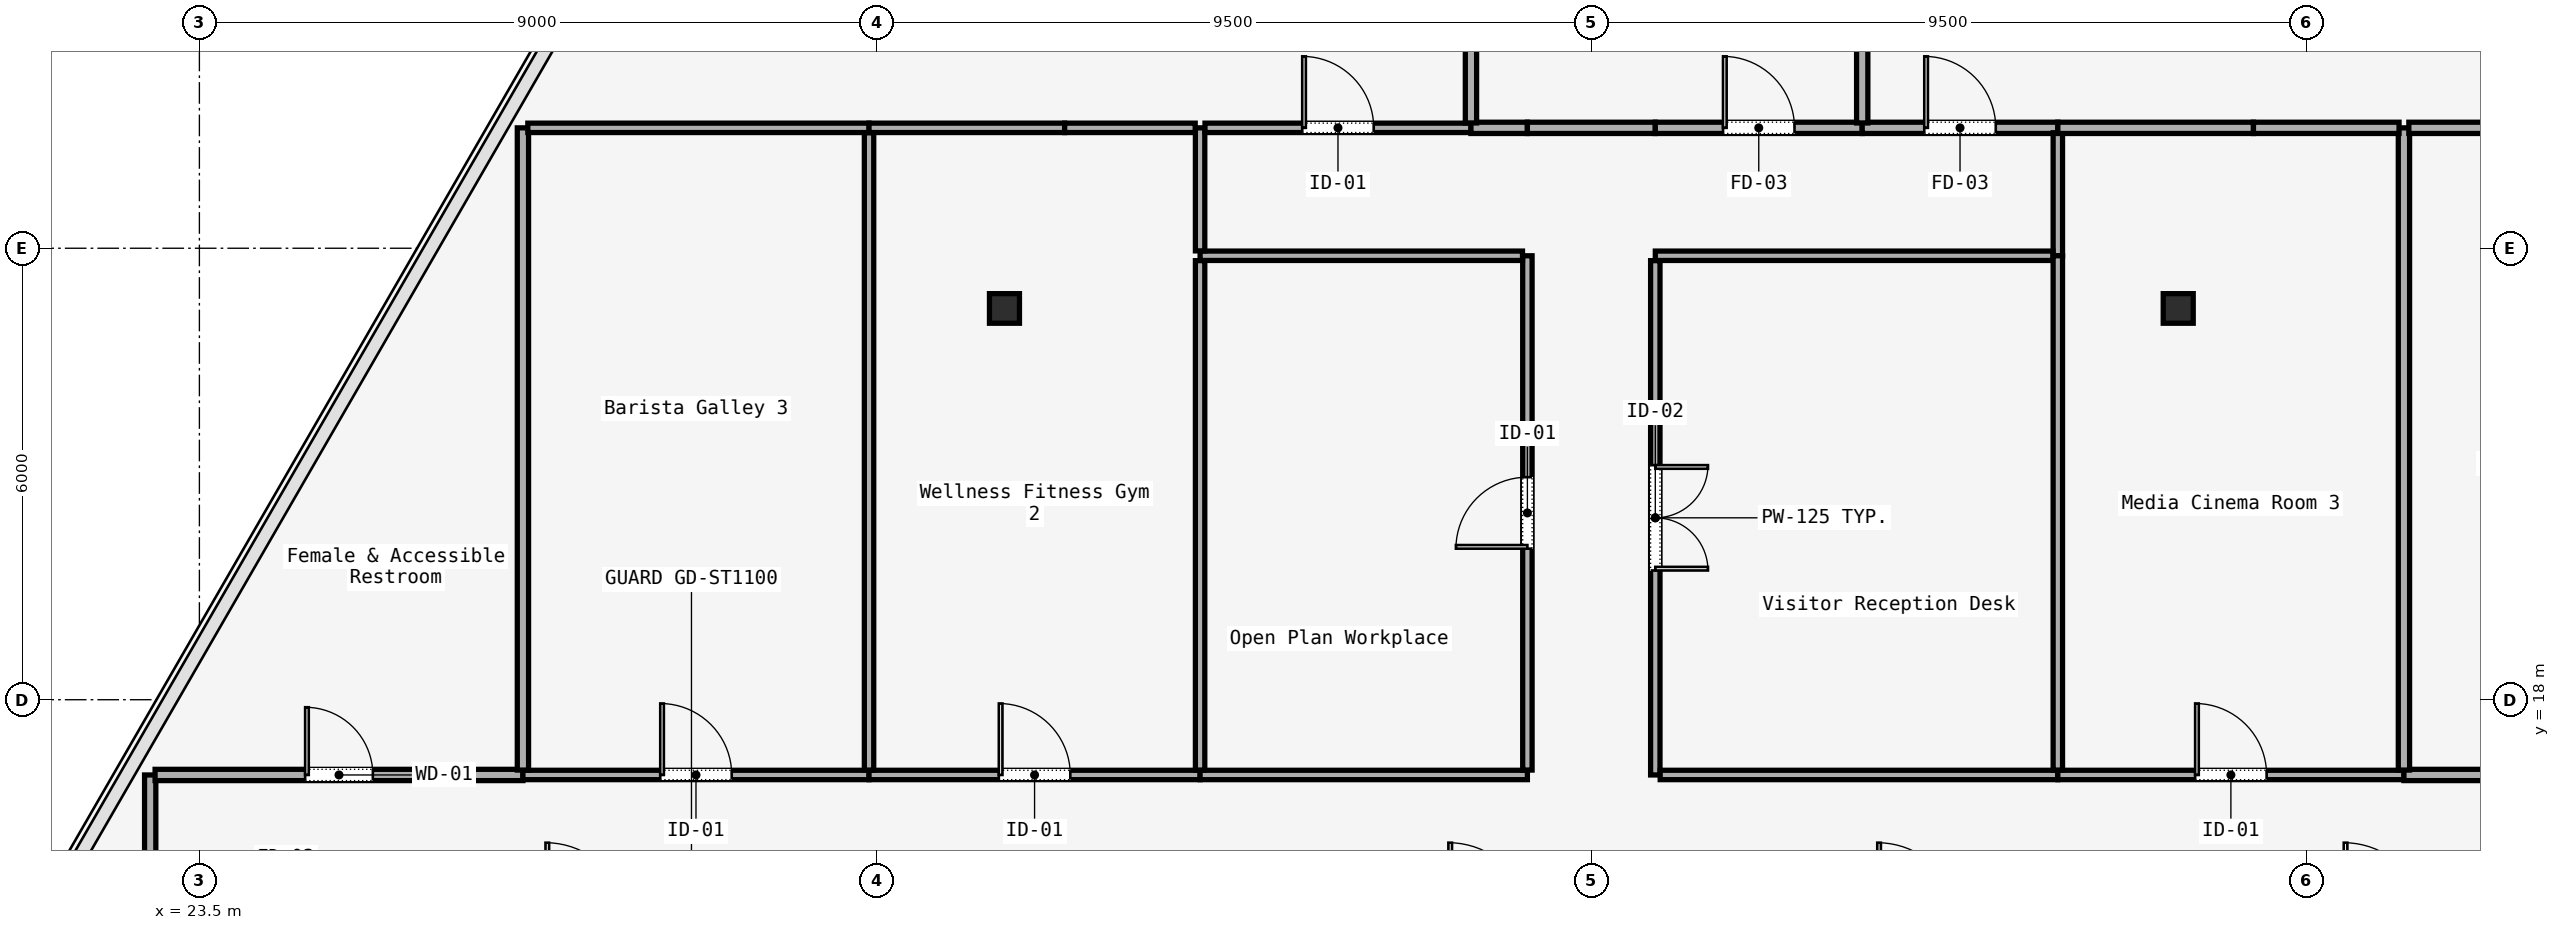
"""IFC4 building model, lengths in metres.
Left out: names, types, materials, properties, quantities, classifications, styles, units other than length and angle.
Written with IfcOpenShell. Run it as: python <this file> out.ifc"""

import sys

from ifc_helpers import new_model, si_unit, direction, frame, frame_2d, origin, origin_2d, place, context, subcontext, project, spatial, rectangle, i_section, extrude, element, fill, save


model = new_model("IFC4")
c1 = context("Model", 3, precision=1e-05, world=origin(), true_north=direction((0.0, 1.0)))
c2 = subcontext(c1, "Body", "Model", "MODEL_VIEW")
j1 = project(units=[si_unit("LENGTHUNIT", "METRE"), si_unit("PLANEANGLEUNIT", "RADIAN")], contexts=[c1])
p1 = place(None, origin())
s1 = spatial("IfcSite", under=j1, at=p1, CompositionType="ELEMENT")
p2 = place(p1, origin())
s2 = spatial("IfcBuilding", under=s1, at=p2, CompositionType="ELEMENT")
p3 = place(p2, frame((0.0, 0.0, 240.8)))
s3 = spatial("IfcBuildingStorey", under=s2, at=p3, CompositionType="ELEMENT", Elevation=240.8)
for number, where, z_axis, x_axis in (
    (1, (34.2, 23.2, 0.0), (0.0, 0.0, 1.0), (1.0, 0.0, 0.0)),
    (2, (49.8, 23.2, 0.0), (0.0, 0.0, 1.0), (1.0, 0.0, 0.0)),
):
    element("IfcColumn", number, at=place(p3, frame(where, z_axis=z_axis, x_axis=x_axis)), inside=s3, PredefinedType="COLUMN", context=c2, shape_type="SweptSolid", body=[
        extrude(i_section(OverallWidth=0.399, OverallDepth=0.394, WebThickness=0.023, FlangeThickness=0.037, FilletRadius=0.015, at=origin_2d()), origin(), (0.0, 0.0, 1.0), 3.58),
    ])
p4 = place(p3, frame((22.846, 15.215, 0.0), z_axis=(0.0, 0.0, 1.0), x_axis=(0.0, 1.0, 0.0)))
e3 = element("IfcWall", 3, at=p4, inside=s3, PredefinedType="PARTITIONING", context=c2, shape_type="SweptSolid", body=[
    extrude(rectangle(XDim=1.785, YDim=0.15, at=frame_2d((0.893, 0.0))), origin(), (0.0, 0.0, 1.0), 3.01),
])
p5 = place(p3, frame((22.911, 17.0, 0.0), z_axis=(0.0, 0.0, 1.0), x_axis=(1.0, 0.0, 0.0)))
e4 = element("IfcWall", 4, at=p5, inside=s3, PredefinedType="PARTITIONING", context=c2, shape_type="SweptSolid", body=[
    extrude(rectangle(XDim=4.889, YDim=0.15, at=frame_2d((2.445, 0.0))), origin(), (0.0, 0.0, 1.0), 3.01),
])
p6 = place(p5, frame((1.994, 0.0, 0.0)))
e5 = element("IfcOpeningElement", 5, at=p6, cuts=e4, PredefinedType="OPENING", context=c2, shape_type="SweptSolid", body=[
    extrude(rectangle(XDim=0.9, YDim=2.15, at=frame_2d((0.45, 1.075))), frame((0.0, 0.075, 0.0), z_axis=(0.0, -1.0, 0.0), x_axis=(1.0, 0.0, 0.0)), (0.0, 0.0, 1.0), 0.15),
])
p7 = place(p3, frame((27.8, 17.0, 0.0), z_axis=(0.0, 0.0, 1.0), x_axis=(1.0, 0.0, 0.0)))
e6 = element("IfcWall", 6, at=p7, inside=s3, PredefinedType="PARTITIONING", context=c2, shape_type="SweptSolid", body=[
    extrude(rectangle(XDim=4.6, YDim=0.125, at=frame_2d((2.3, 0.0))), origin(), (0.0, 0.0, 1.0), 3.01),
])
p8 = place(p7, frame((1.825, 0.0, 0.0)))
e7 = element("IfcOpeningElement", 7, at=p8, cuts=e6, PredefinedType="OPENING", context=c2, shape_type="SweptSolid", body=[
    extrude(rectangle(XDim=0.95, YDim=2.2, at=frame_2d((0.475, 1.1))), frame((0.0, 0.062, 0.0), z_axis=(0.0, -1.0, 0.0), x_axis=(1.0, 0.0, 0.0)), (0.0, 0.0, 1.0), 0.125),
])
p9 = place(p3, frame((32.4, 17.0, 0.0), z_axis=(0.0, 0.0, 1.0), x_axis=(1.0, 0.0, 0.0)))
e8 = element("IfcWall", 8, at=p9, inside=s3, PredefinedType="PARTITIONING", context=c2, shape_type="SweptSolid", body=[
    extrude(rectangle(XDim=4.4, YDim=0.125, at=frame_2d((2.2, 0.0))), origin(), (0.0, 0.0, 1.0), 3.01),
])
p10 = place(p9, frame((1.725, 0.0, 0.0)))
e9 = element("IfcOpeningElement", 9, at=p10, cuts=e8, PredefinedType="OPENING", context=c2, shape_type="SweptSolid", body=[
    extrude(rectangle(XDim=0.95, YDim=2.2, at=frame_2d((0.475, 1.1))), frame((0.0, 0.062, 0.0), z_axis=(0.0, -1.0, 0.0), x_axis=(1.0, 0.0, 0.0)), (0.0, 0.0, 1.0), 0.125),
])
p11 = place(p3, frame((36.8, 17.0, 0.0), z_axis=(0.0, 0.0, 1.0), x_axis=(1.0, 0.0, 0.0)))
e10 = element("IfcWall", 10, at=p11, inside=s3, PredefinedType="PARTITIONING", context=c2, shape_type="SweptSolid", body=[
    extrude(rectangle(XDim=4.35, YDim=0.125, at=frame_2d((2.175, 0.0))), origin(), (0.0, 0.0, 1.0), 3.01),
])
p12 = place(p3, frame((41.15, 17.065, 0.0), z_axis=(0.0, 0.0, 1.0), x_axis=(0.0, 1.0, 0.0)))
e11 = element("IfcWall", 11, at=p12, inside=s3, PredefinedType="PARTITIONING", context=c2, shape_type="SweptSolid", body=[
    extrude(rectangle(XDim=6.835, YDim=0.125, at=frame_2d((3.417, 0.0))), origin(), (0.0, 0.0, 1.0), 3.01),
])
p13 = place(p12, frame((2.942, 0.0, 0.0)))
e12 = element("IfcOpeningElement", 12, at=p13, cuts=e11, PredefinedType="OPENING", context=c2, shape_type="SweptSolid", body=[
    extrude(rectangle(XDim=0.95, YDim=2.2, at=frame_2d((0.475, 1.1))), frame((0.0, 0.062, 0.0), z_axis=(0.0, -1.0, 0.0), x_axis=(1.0, 0.0, 0.0)), (0.0, 0.0, 1.0), 0.125),
])
p14 = place(p3, frame((41.085, 23.9, 0.0), z_axis=(0.0, 0.0, 1.0), x_axis=(-1.0, 0.0, 0.0)))
e13 = element("IfcWall", 13, at=p14, inside=s3, PredefinedType="PARTITIONING", context=c2, shape_type="SweptSolid", body=[
    extrude(rectangle(XDim=4.285, YDim=0.125, at=frame_2d((2.143, 0.0))), origin(), (0.0, 0.0, 1.0), 3.01),
])
p15 = place(p3, frame((36.8, 23.965, 0.0), z_axis=(0.0, 0.0, 1.0), x_axis=(0.0, 1.0, 0.0)))
e14 = element("IfcWall", 14, at=p15, inside=s3, PredefinedType="PARTITIONING", context=c2, shape_type="SweptSolid", body=[
    extrude(rectangle(XDim=1.635, YDim=0.125, at=frame_2d((0.817, 0.0))), origin(), (0.0, 0.0, 1.0), 3.01),
])
p16 = place(p3, frame((36.865, 25.6, 0.0), z_axis=(0.0, 0.0, 1.0), x_axis=(1.0, 0.0, 0.0)))
e15 = element("IfcWall", 15, at=p16, inside=s3, PredefinedType="PARTITIONING", context=c2, shape_type="SweptSolid", body=[
    extrude(rectangle(XDim=3.535, YDim=0.125, at=frame_2d((1.768, 0.0))), origin(), (0.0, 0.0, 1.0), 3.01),
])
p17 = place(p16, frame((1.292, 0.0, 0.0)))
e16 = element("IfcOpeningElement", 16, at=p17, cuts=e15, PredefinedType="OPENING", context=c2, shape_type="SweptSolid", body=[
    extrude(rectangle(XDim=0.95, YDim=2.2, at=frame_2d((0.475, 1.1))), frame((0.0, 0.062, 0.0), z_axis=(0.0, -1.0, 0.0), x_axis=(1.0, 0.0, 0.0)), (0.0, 0.0, 1.0), 0.125),
])
p18 = place(p3, frame((40.4, 25.6, 0.0), z_axis=(0.0, 0.0, 1.0), x_axis=(1.0, 0.0, 0.0)))
e17 = element("IfcWall", 17, at=p18, inside=s3, PredefinedType="PARTITIONING", context=c2, shape_type="SweptSolid", body=[
    extrude(rectangle(XDim=0.75, YDim=0.15, at=frame_2d((0.375, 0.0))), origin(), (0.0, 0.0, 1.0), 3.01),
])
p19 = place(p3, frame((41.15, 25.6, 0.0), z_axis=(0.0, 0.0, 1.0), x_axis=(1.0, 0.0, 0.0)))
e18 = element("IfcWall", 18, at=p19, inside=s3, PredefinedType="PARTITIONING", context=c2, shape_type="SweptSolid", body=[
    extrude(rectangle(XDim=1.7, YDim=0.15, at=frame_2d((0.85, 0.0))), origin(), (0.0, 0.0, 1.0), 3.01),
])
p20 = place(p3, frame((42.85, 25.6, 0.0), z_axis=(0.0, 0.0, 1.0), x_axis=(1.0, 0.0, 0.0)))
e19 = element("IfcWall", 19, at=p20, inside=s3, PredefinedType="PARTITIONING", context=c2, shape_type="SweptSolid", body=[
    extrude(rectangle(XDim=2.75, YDim=0.15, at=frame_2d((1.375, 0.0))), origin(), (0.0, 0.0, 1.0), 3.01),
])
p21 = place(p20, frame((0.9, 0.0, 0.0)))
e20 = element("IfcOpeningElement", 20, at=p21, cuts=e19, PredefinedType="OPENING", context=c2, shape_type="SweptSolid", body=[
    extrude(rectangle(XDim=0.95, YDim=2.2, at=frame_2d((0.475, 1.1))), frame((0.0, 0.075, 0.0), z_axis=(0.0, -1.0, 0.0), x_axis=(1.0, 0.0, 0.0)), (0.0, 0.0, 1.0), 0.15),
])
p22 = place(p3, frame((45.6, 25.6, 0.0), z_axis=(0.0, 0.0, 1.0), x_axis=(1.0, 0.0, 0.0)))
e21 = element("IfcWall", 21, at=p22, inside=s3, PredefinedType="PARTITIONING", context=c2, shape_type="SweptSolid", body=[
    extrude(rectangle(XDim=2.6, YDim=0.15, at=frame_2d((1.3, 0.0))), origin(), (0.0, 0.0, 1.0), 3.01),
])
p23 = place(p22, frame((0.825, 0.0, 0.0)))
e22 = element("IfcOpeningElement", 22, at=p23, cuts=e21, PredefinedType="OPENING", context=c2, shape_type="SweptSolid", body=[
    extrude(rectangle(XDim=0.95, YDim=2.2, at=frame_2d((0.475, 1.1))), frame((0.0, 0.075, 0.0), z_axis=(0.0, -1.0, 0.0), x_axis=(1.0, 0.0, 0.0)), (0.0, 0.0, 1.0), 0.15),
])
p24 = place(p3, frame((48.2, 25.535, 0.0), z_axis=(0.0, 0.0, 1.0), x_axis=(0.0, -1.0, 0.0)))
e23 = element("IfcWall", 23, at=p24, inside=s3, PredefinedType="PARTITIONING", context=c2, shape_type="SweptSolid", body=[
    extrude(rectangle(XDim=1.635, YDim=0.125, at=frame_2d((0.817, 0.0))), origin(), (0.0, 0.0, 1.0), 3.01),
])
p25 = place(p3, frame((48.135, 23.9, 0.0), z_axis=(0.0, 0.0, 1.0), x_axis=(-1.0, 0.0, 0.0)))
e24 = element("IfcWall", 24, at=p25, inside=s3, PredefinedType="PARTITIONING", context=c2, shape_type="SweptSolid", body=[
    extrude(rectangle(XDim=5.285, YDim=0.125, at=frame_2d((2.643, 0.0))), origin(), (0.0, 0.0, 1.0), 3.01),
])
p26 = place(p3, frame((42.85, 23.835, 0.0), z_axis=(0.0, 0.0, 1.0), x_axis=(0.0, -1.0, 0.0)))
e25 = element("IfcWall", 25, at=p26, inside=s3, PredefinedType="PARTITIONING", context=c2, shape_type="SweptSolid", body=[
    extrude(rectangle(XDim=6.835, YDim=0.125, at=frame_2d((3.417, 0.0))), origin(), (0.0, 0.0, 1.0), 3.01),
])
p27 = place(p26, frame((2.718, 0.0, 0.0)))
e26 = element("IfcOpeningElement", 26, at=p27, cuts=e25, PredefinedType="OPENING", context=c2, shape_type="SweptSolid", body=[
    extrude(rectangle(XDim=1.4, YDim=2.2, at=frame_2d((0.7, 1.1))), frame((0.0, 0.062, 0.0), z_axis=(0.0, -1.0, 0.0), x_axis=(1.0, 0.0, 0.0)), (0.0, 0.0, 1.0), 0.125),
])
p28 = place(p3, frame((42.915, 17.0, 0.0), z_axis=(0.0, 0.0, 1.0), x_axis=(1.0, 0.0, 0.0)))
e27 = element("IfcWall", 27, at=p28, inside=s3, PredefinedType="PARTITIONING", context=c2, shape_type="SweptSolid", body=[
    extrude(rectangle(XDim=5.285, YDim=0.125, at=frame_2d((2.643, 0.0))), origin(), (0.0, 0.0, 1.0), 3.01),
])
p29 = place(p3, frame((48.2, 17.0, 0.0), z_axis=(0.0, 0.0, 1.0), x_axis=(1.0, 0.0, 0.0)))
e28 = element("IfcWall", 28, at=p29, inside=s3, PredefinedType="PARTITIONING", context=c2, shape_type="SweptSolid", body=[
    extrude(rectangle(XDim=4.6, YDim=0.125, at=frame_2d((2.3, 0.0))), origin(), (0.0, 0.0, 1.0), 3.01),
])
p30 = place(p29, frame((1.825, 0.0, 0.0)))
e29 = element("IfcOpeningElement", 29, at=p30, cuts=e28, PredefinedType="OPENING", context=c2, shape_type="SweptSolid", body=[
    extrude(rectangle(XDim=0.95, YDim=2.2, at=frame_2d((0.475, 1.1))), frame((0.0, 0.062, 0.0), z_axis=(0.0, -1.0, 0.0), x_axis=(1.0, 0.0, 0.0)), (0.0, 0.0, 1.0), 0.125),
])
p31 = place(p3, frame((52.8, 17.0, 0.0), z_axis=(0.0, 0.0, 1.0), x_axis=(1.0, 0.0, 0.0)))
e30 = element("IfcWall", 30, at=p31, inside=s3, PredefinedType="PARTITIONING", context=c2, shape_type="SweptSolid", body=[
    extrude(rectangle(XDim=4.6, YDim=0.15, at=frame_2d((2.3, 0.0))), origin(), (0.0, 0.0, 1.0), 3.01),
])
p32 = place(p31, frame((1.825, 0.0, 0.0)))
e31 = element("IfcOpeningElement", 31, at=p32, cuts=e30, PredefinedType="OPENING", context=c2, shape_type="SweptSolid", body=[
    extrude(rectangle(XDim=0.95, YDim=2.2, at=frame_2d((0.475, 1.1))), frame((0.0, 0.075, 0.0), z_axis=(0.0, -1.0, 0.0), x_axis=(1.0, 0.0, 0.0)), (0.0, 0.0, 1.0), 0.15),
])
p33 = place(p3, frame((27.8, 25.6, 0.0), z_axis=(0.0, 0.0, 1.0), x_axis=(0.0, -1.0, 0.0)))
e32 = element("IfcWall", 32, at=p33, inside=s3, PredefinedType="PARTITIONING", context=c2, shape_type="SweptSolid", body=[
    extrude(rectangle(XDim=8.535, YDim=0.15, at=frame_2d((4.268, 0.0))), origin(), (0.0, 0.0, 1.0), 3.01),
])
p34 = place(p3, frame((36.8, 17.065, 0.0), z_axis=(0.0, 0.0, 1.0), x_axis=(0.0, 1.0, 0.0)))
e33 = element("IfcWall", 33, at=p34, inside=s3, PredefinedType="PARTITIONING", context=c2, shape_type="SweptSolid", body=[
    extrude(rectangle(XDim=6.77, YDim=0.125, at=frame_2d((3.385, 0.0))), origin(), (0.0, 0.0, 1.0), 3.01),
])
p35 = place(p3, frame((48.2, 23.9, 0.0), z_axis=(0.0, 0.0, 1.0), x_axis=(0.0, -1.0, 0.0)))
e34 = element("IfcWall", 34, at=p35, inside=s3, PredefinedType="PARTITIONING", context=c2, shape_type="SweptSolid", body=[
    extrude(rectangle(XDim=6.835, YDim=0.125, at=frame_2d((3.417, 0.0))), origin(), (0.0, 0.0, 1.0), 3.01),
])
p36 = place(p3, frame((52.8, 17.065, 0.0), z_axis=(0.0, 0.0, 1.0), x_axis=(0.0, 1.0, 0.0)))
e35 = element("IfcWall", 35, at=p36, inside=s3, PredefinedType="PARTITIONING", context=c2, shape_type="SweptSolid", body=[
    extrude(rectangle(XDim=8.535, YDim=0.15, at=frame_2d((4.268, 0.0))), origin(), (0.0, 0.0, 1.0), 3.01),
])
p37 = place(p3, frame((52.865, 25.6, 0.0), z_axis=(0.0, 0.0, 1.0), x_axis=(1.0, 0.0, 0.0)))
e36 = element("IfcWall", 36, at=p37, inside=s3, PredefinedType="PARTITIONING", context=c2, shape_type="SweptSolid", body=[
    extrude(rectangle(XDim=3.633, YDim=0.15, at=frame_2d((1.817, 0.0))), origin(), (0.0, 0.0, 1.0), 3.01),
])
p38 = place(p3, frame((27.865, 25.6, 0.0), z_axis=(0.0, 0.0, 1.0), x_axis=(1.0, 0.0, 0.0)))
e37 = element("IfcWall", 37, at=p38, inside=s3, PredefinedType="PARTITIONING", context=c2, shape_type="SweptSolid", body=[
    extrude(rectangle(XDim=4.535, YDim=0.125, at=frame_2d((2.268, 0.0))), origin(), (0.0, 0.0, 1.0), 3.01),
])
p39 = place(p3, frame((32.4, 25.535, 0.0), z_axis=(0.0, 0.0, 1.0), x_axis=(0.0, -1.0, 0.0)))
e38 = element("IfcWall", 38, at=p39, inside=s3, PredefinedType="PARTITIONING", context=c2, shape_type="SweptSolid", body=[
    extrude(rectangle(XDim=8.47, YDim=0.125, at=frame_2d((4.235, 0.0))), origin(), (0.0, 0.0, 1.0), 3.01),
])
p40 = place(p3, frame((32.4, 25.6, 0.0), z_axis=(0.0, 0.0, 1.0), x_axis=(1.0, 0.0, 0.0)))
e39 = element("IfcWall", 39, at=p40, inside=s3, PredefinedType="PARTITIONING", context=c2, shape_type="SweptSolid", body=[
    extrude(rectangle(XDim=2.6, YDim=0.125, at=frame_2d((1.3, 0.0))), origin(), (0.0, 0.0, 1.0), 3.01),
])
p41 = place(p3, frame((35.0, 25.6, 0.0), z_axis=(0.0, 0.0, 1.0), x_axis=(1.0, 0.0, 0.0)))
e40 = element("IfcWall", 40, at=p41, inside=s3, PredefinedType="PARTITIONING", context=c2, shape_type="SweptSolid", body=[
    extrude(rectangle(XDim=1.735, YDim=0.125, at=frame_2d((0.868, 0.0))), origin(), (0.0, 0.0, 1.0), 3.01),
])
p42 = place(p3, frame((48.2, 25.6, 0.0), z_axis=(0.0, 0.0, 1.0), x_axis=(1.0, 0.0, 0.0)))
e41 = element("IfcWall", 41, at=p42, inside=s3, PredefinedType="PARTITIONING", context=c2, shape_type="SweptSolid", body=[
    extrude(rectangle(XDim=2.6, YDim=0.15, at=frame_2d((1.3, 0.0))), origin(), (0.0, 0.0, 1.0), 3.01),
])
p43 = place(p3, frame((50.8, 25.6, 0.0), z_axis=(0.0, 0.0, 1.0), x_axis=(1.0, 0.0, 0.0)))
e42 = element("IfcWall", 42, at=p43, inside=s3, PredefinedType="PARTITIONING", context=c2, shape_type="SweptSolid", body=[
    extrude(rectangle(XDim=1.935, YDim=0.15, at=frame_2d((0.968, 0.0))), origin(), (0.0, 0.0, 1.0), 3.01),
])
p44 = place(p3, frame((45.6, 25.665, 0.0), z_axis=(0.0, 0.0, 1.0), x_axis=(0.0, 1.0, 0.0)))
e43 = element("IfcWall", 43, at=p44, inside=s3, PredefinedType="PARTITIONING", context=c2, shape_type="SweptSolid", body=[
    extrude(rectangle(XDim=18.811, YDim=0.15, at=frame_2d((9.406, 0.0))), origin(), (0.0, 0.0, 1.0), 3.01),
])
p45 = place(p3, frame((40.4, 44.99, 0.0), z_axis=(0.0, 0.0, 1.0), x_axis=(0.0, -1.0, 0.0)))
e44 = element("IfcWall", 44, at=p45, inside=s3, PredefinedType="PARTITIONING", context=c2, shape_type="SweptSolid", body=[
    extrude(rectangle(XDim=19.324, YDim=0.15, at=frame_2d((9.662, 0.0))), origin(), (0.0, 0.0, 1.0), 3.01),
])
p46 = place(p6, origin())
e45 = element("IfcDoor", 45, at=p46, inside=s3, OperationType="SINGLE_SWING_RIGHT", PredefinedType="DOOR", context=c2, shape_type="SweptSolid", body=[
    extrude(rectangle(XDim=0.9, YDim=2.15, at=frame_2d((0.45, 1.075))), frame((0.0, 0.025, 0.0), z_axis=(0.0, -1.0, 0.0), x_axis=(1.0, 0.0, 0.0)), (0.0, 0.0, 1.0), 0.05),
])
fill(e5, e45)
p47 = place(p13, origin())
e46 = element("IfcDoor", 46, at=p47, inside=s3, OperationType="SINGLE_SWING_LEFT", PredefinedType="DOOR", context=c2, shape_type="SweptSolid", body=[
    extrude(rectangle(XDim=0.95, YDim=2.2, at=frame_2d((0.475, 1.1))), frame((0.0, 0.025, 0.0), z_axis=(0.0, -1.0, 0.0), x_axis=(1.0, 0.0, 0.0)), (0.0, 0.0, 1.0), 0.05),
])
fill(e12, e46)
p48 = place(p27, origin())
e47 = element("IfcDoor", 47, at=p48, inside=s3, OperationType="SINGLE_SWING_RIGHT", PredefinedType="DOOR", context=c2, shape_type="SweptSolid", body=[
    extrude(rectangle(XDim=1.4, YDim=2.2, at=frame_2d((0.7, 1.1))), frame((0.0, 0.025, 0.0), z_axis=(0.0, -1.0, 0.0), x_axis=(1.0, 0.0, 0.0)), (0.0, 0.0, 1.0), 0.05),
])
fill(e26, e47)
p49 = place(p8, origin())
e48 = element("IfcDoor", 48, at=p49, inside=s3, OperationType="SINGLE_SWING_RIGHT", PredefinedType="DOOR", context=c2, shape_type="SweptSolid", body=[
    extrude(rectangle(XDim=0.95, YDim=2.2, at=frame_2d((0.475, 1.1))), frame((0.0, 0.025, 0.0), z_axis=(0.0, -1.0, 0.0), x_axis=(1.0, 0.0, 0.0)), (0.0, 0.0, 1.0), 0.05),
])
fill(e7, e48)
p50 = place(p10, origin())
e49 = element("IfcDoor", 49, at=p50, inside=s3, OperationType="SINGLE_SWING_LEFT", PredefinedType="DOOR", context=c2, shape_type="SweptSolid", body=[
    extrude(rectangle(XDim=0.95, YDim=2.2, at=frame_2d((0.475, 1.1))), frame((0.0, 0.025, 0.0), z_axis=(0.0, -1.0, 0.0), x_axis=(1.0, 0.0, 0.0)), (0.0, 0.0, 1.0), 0.05),
])
fill(e9, e49)
p51 = place(p30, origin())
e50 = element("IfcDoor", 50, at=p51, inside=s3, OperationType="SINGLE_SWING_RIGHT", PredefinedType="DOOR", context=c2, shape_type="SweptSolid", body=[
    extrude(rectangle(XDim=0.95, YDim=2.2, at=frame_2d((0.475, 1.1))), frame((0.0, 0.025, 0.0), z_axis=(0.0, -1.0, 0.0), x_axis=(1.0, 0.0, 0.0)), (0.0, 0.0, 1.0), 0.05),
])
fill(e29, e50)
p52 = place(p23, origin())
e51 = element("IfcDoor", 51, at=p52, inside=s3, OperationType="SINGLE_SWING_LEFT", PredefinedType="DOOR", context=c2, shape_type="SweptSolid", body=[
    extrude(rectangle(XDim=0.95, YDim=2.2, at=frame_2d((0.475, 1.1))), frame((0.0, 0.025, 0.0), z_axis=(0.0, -1.0, 0.0), x_axis=(1.0, 0.0, 0.0)), (0.0, 0.0, 1.0), 0.05),
])
fill(e22, e51)
p53 = place(p17, origin())
e52 = element("IfcDoor", 52, at=p53, inside=s3, OperationType="SINGLE_SWING_RIGHT", PredefinedType="DOOR", context=c2, shape_type="SweptSolid", body=[
    extrude(rectangle(XDim=0.95, YDim=2.2, at=frame_2d((0.475, 1.1))), frame((0.0, 0.025, 0.0), z_axis=(0.0, -1.0, 0.0), x_axis=(1.0, 0.0, 0.0)), (0.0, 0.0, 1.0), 0.05),
])
fill(e16, e52)
p54 = place(p21, origin())
e53 = element("IfcDoor", 53, at=p54, inside=s3, OperationType="SINGLE_SWING_LEFT", PredefinedType="DOOR", context=c2, shape_type="SweptSolid", body=[
    extrude(rectangle(XDim=0.95, YDim=2.2, at=frame_2d((0.475, 1.1))), frame((0.0, 0.025, 0.0), z_axis=(0.0, -1.0, 0.0), x_axis=(1.0, 0.0, 0.0)), (0.0, 0.0, 1.0), 0.05),
])
fill(e20, e53)
save(model, sys.argv[1])
